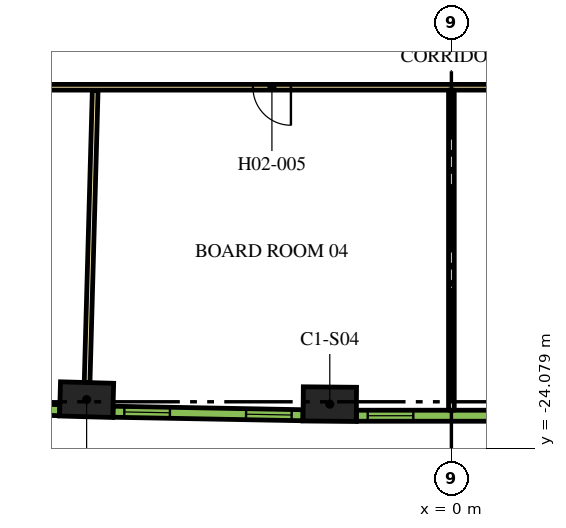
"""IFC4 building model, lengths in metres.
Left out: names, types, materials, properties, quantities, classifications, styles, units other than length and angle.
Written with IfcOpenShell. Run it as: python <this file> out.ifc"""

import sys

from ifc_helpers import new_model, si_unit, direction, frame, frame_2d, origin, origin_2d, place, context, subcontext, project, spatial, rectangle, extrude, element, fill, save


model = new_model("IFC4")
c1 = context("Model", 3, precision=1e-05, world=origin(), true_north=direction((0.0, 1.0)))
c2 = subcontext(c1, "Body", "Model", "MODEL_VIEW")
j1 = project(units=[si_unit("LENGTHUNIT", "METRE"), si_unit("PLANEANGLEUNIT", "RADIAN")], contexts=[c1])
p1 = place(None, origin())
s1 = spatial("IfcSite", under=j1, at=p1, CompositionType="ELEMENT")
p2 = place(p1, origin())
s2 = spatial("IfcBuilding", under=s1, at=p2, CompositionType="ELEMENT")
p3 = place(p2, frame((0.0, 0.0, 47.1)))
s3 = spatial("IfcBuildingStorey", under=s2, at=p3, CompositionType="ELEMENT", Elevation=47.1)
for number, where, z_axis, x_axis in (
    (1, (-9.599, -22.795, 0.0), (0.0, 0.0, 1.0), (1.0, -0.028, 0.0)),
    (2, (-3.2, -22.913, 0.0), (0.0, 0.0, 1.0), (1.0, -0.009, 0.0)),
):
    element("IfcColumn", number, at=place(p3, frame(where, z_axis=z_axis, x_axis=x_axis)), inside=s3, PredefinedType="COLUMN", context=c2, shape_type="SweptSolid", body=[
        extrude(rectangle(XDim=1.4, YDim=0.9, at=origin_2d()), origin(), (0.0, 0.0, 1.0), 3.9),
    ])
p4 = place(p3, frame((12.918, -14.575, 0.0), z_axis=(0.0, 0.0, 1.0), x_axis=(-1.0, 0.0, 0.0)))
e3 = element("IfcWall", 3, at=p4, inside=s3, PredefinedType="PARTITIONING", context=c2, shape_type="SweptSolid", body=[
    extrude(rectangle(XDim=25.766, YDim=0.15, at=frame_2d((12.883, 0.0))), origin(), (0.0, 0.0, 1.0), 2.75),
])
p5 = place(p4, frame((17.141, 0.0, 0.0)))
e4 = element("IfcOpeningElement", 4, at=p5, cuts=e3, PredefinedType="OPENING", context=c2, shape_type="SweptSolid", body=[
    extrude(rectangle(XDim=1.0, YDim=2.1, at=frame_2d((0.5, 1.05))), frame((0.0, 0.085, 0.0), z_axis=(0.0, -1.0, 0.0), x_axis=(1.0, 0.0, 0.0)), (0.0, 0.0, 1.0), 0.17),
])
p6 = place(p4, frame((9.259, 0.0, 0.0)))
e5 = element("IfcOpeningElement", 5, at=p6, cuts=e3, PredefinedType="OPENING", context=c2, shape_type="SweptSolid", body=[
    extrude(rectangle(XDim=1.0, YDim=2.1, at=frame_2d((0.5, 1.05))), frame((0.0, 0.085, 0.0), z_axis=(0.0, -1.0, 0.0), x_axis=(1.0, 0.0, 0.0)), (0.0, 0.0, 1.0), 0.17),
])
p7 = place(p4, frame((3.044, 0.0, 0.0)))
e6 = element("IfcOpeningElement", 6, at=p7, cuts=e3, PredefinedType="OPENING", context=c2, shape_type="SweptSolid", body=[
    extrude(rectangle(XDim=1.0, YDim=2.1, at=frame_2d((0.5, 1.05))), frame((0.0, 0.085, 0.0), z_axis=(0.0, -1.0, 0.0), x_axis=(1.0, 0.0, 0.0)), (0.0, 0.0, 1.0), 0.17),
])
p8 = place(p3, frame((-9.586, -22.345, 0.0), z_axis=(0.0, 0.0, 1.0), x_axis=(0.027722115646, 0.999615668297, 0.0)))
e7 = element("IfcWall", 7, at=p8, inside=s3, PredefinedType="PARTITIONING", context=c2, shape_type="SweptSolid", body=[
    extrude(rectangle(XDim=7.688, YDim=0.15, at=frame_2d((3.844, 0.0))), origin(), (0.0, 0.0, 1.0), 2.75),
])
p9 = place(p3, frame((0.0, -23.073, 0.0), z_axis=(0.0, 0.0, 1.0), x_axis=(0.0, 1.0, 0.0)))
e8 = element("IfcWall", 8, at=p9, inside=s3, PredefinedType="PARTITIONING", context=c2, shape_type="SweptSolid", body=[
    extrude(rectangle(XDim=8.423, YDim=0.15, at=frame_2d((4.212, 0.0))), origin(), (0.0, 0.0, 1.0), 2.75),
])
p10 = place(p3, frame((-15.305, -22.889, 0.0), z_axis=(0.0, 0.0, 1.0), x_axis=(0.999317974969, -0.036926750529, 0.0)))
e9 = element("IfcWall", 9, at=p10, inside=s3, PredefinedType="SOLIDWALL", context=c2, shape_type="SweptSolid", body=[
    extrude(rectangle(XDim=4.998, YDim=0.29, at=frame_2d((2.499, 0.0))), origin(), (0.0, 0.0, 1.0), 3.65),
])
p11 = place(p10, frame((0.297, 0.0, 0.9)))
e10 = element("IfcOpeningElement", 10, at=p11, cuts=e9, PredefinedType="OPENING", context=c2, shape_type="SweptSolid", body=[
    extrude(rectangle(XDim=1.2, YDim=2.15, at=frame_2d((0.6, 1.075))), frame((0.0, 0.155, 0.0), z_axis=(0.0, -1.0, 0.0), x_axis=(1.0, 0.0, 0.0)), (0.0, 0.0, 1.0), 0.31),
])
p12 = place(p10, frame((3.501, 0.0, 0.9)))
e11 = element("IfcOpeningElement", 11, at=p12, cuts=e9, PredefinedType="OPENING", context=c2, shape_type="SweptSolid", body=[
    extrude(rectangle(XDim=1.2, YDim=2.15, at=frame_2d((0.6, 1.075))), frame((0.0, 0.155, 0.0), z_axis=(0.0, -1.0, 0.0), x_axis=(1.0, 0.0, 0.0)), (0.0, 0.0, 1.0), 0.31),
])
p13 = place(p3, frame((-8.904, -23.113, 0.0), z_axis=(0.0, 0.0, 1.0), x_axis=(0.999829529479, -0.018463801951, 0.0)))
e12 = element("IfcWall", 12, at=p13, inside=s3, PredefinedType="SOLIDWALL", context=c2, shape_type="SweptSolid", body=[
    extrude(rectangle(XDim=4.998, YDim=0.29, at=frame_2d((2.499, 0.0))), origin(), (0.0, 0.0, 1.0), 3.65),
])
p14 = place(p13, frame((0.297, 0.0, 0.9)))
e13 = element("IfcOpeningElement", 13, at=p14, cuts=e12, PredefinedType="OPENING", context=c2, shape_type="SweptSolid", body=[
    extrude(rectangle(XDim=1.2, YDim=2.15, at=frame_2d((0.6, 1.075))), frame((0.0, 0.155, 0.0), z_axis=(0.0, -1.0, 0.0), x_axis=(1.0, 0.0, 0.0)), (0.0, 0.0, 1.0), 0.31),
])
p15 = place(p13, frame((3.501, 0.0, 0.9)))
e14 = element("IfcOpeningElement", 14, at=p15, cuts=e12, PredefinedType="OPENING", context=c2, shape_type="SweptSolid", body=[
    extrude(rectangle(XDim=1.2, YDim=2.15, at=frame_2d((0.6, 1.075))), frame((0.0, 0.155, 0.0), z_axis=(0.0, -1.0, 0.0), x_axis=(1.0, 0.0, 0.0)), (0.0, 0.0, 1.0), 0.31),
])
p16 = place(p3, frame((-2.499, -23.218, 0.0), z_axis=(0.0, 0.0, 1.0), x_axis=(1.0, 0.0, 0.0)))
e15 = element("IfcWall", 15, at=p16, inside=s3, PredefinedType="SOLIDWALL", context=c2, shape_type="SweptSolid", body=[
    extrude(rectangle(XDim=4.998, YDim=0.29, at=frame_2d((2.499, 0.0))), origin(), (0.0, 0.0, 1.0), 3.65),
])
p17 = place(p16, frame((0.297, 0.0, 0.9)))
e16 = element("IfcOpeningElement", 16, at=p17, cuts=e15, PredefinedType="OPENING", context=c2, shape_type="SweptSolid", body=[
    extrude(rectangle(XDim=1.2, YDim=2.15, at=frame_2d((0.6, 1.075))), frame((0.0, 0.155, 0.0), z_axis=(0.0, -1.0, 0.0), x_axis=(1.0, 0.0, 0.0)), (0.0, 0.0, 1.0), 0.31),
])
p18 = place(p16, frame((3.501, 0.0, 0.9)))
e17 = element("IfcOpeningElement", 17, at=p18, cuts=e15, PredefinedType="OPENING", context=c2, shape_type="SweptSolid", body=[
    extrude(rectangle(XDim=1.2, YDim=2.15, at=frame_2d((0.6, 1.075))), frame((0.0, 0.155, 0.0), z_axis=(0.0, -1.0, 0.0), x_axis=(1.0, 0.0, 0.0)), (0.0, 0.0, 1.0), 0.31),
])
p19 = place(p5, origin())
e18 = element("IfcDoor", 18, at=p19, inside=s3, OperationType="SINGLE_SWING_RIGHT", PredefinedType="DOOR", context=c2, shape_type="SweptSolid", body=[
    extrude(rectangle(XDim=1.0, YDim=2.1, at=frame_2d((0.5, 1.05))), frame((0.0, 0.025, 0.0), z_axis=(0.0, -1.0, 0.0), x_axis=(1.0, 0.0, 0.0)), (0.0, 0.0, 1.0), 0.05),
])
fill(e4, e18)
p20 = place(p14, origin())
e19 = element("IfcWindow", 19, at=p20, inside=s3, PartitioningType="DOUBLE_PANEL_VERTICAL", PredefinedType="WINDOW", context=c2, shape_type="SweptSolid", body=[
    extrude(rectangle(XDim=1.2, YDim=2.15, at=frame_2d((0.6, 1.075))), frame((0.0, 0.015, 0.0), z_axis=(0.0, -1.0, 0.0), x_axis=(1.0, 0.0, 0.0)), (0.0, 0.0, 1.0), 0.06),
])
fill(e13, e19)
p21 = place(p15, origin())
e20 = element("IfcWindow", 20, at=p21, inside=s3, PartitioningType="DOUBLE_PANEL_VERTICAL", PredefinedType="WINDOW", context=c2, shape_type="SweptSolid", body=[
    extrude(rectangle(XDim=1.2, YDim=2.15, at=frame_2d((0.6, 1.075))), frame((0.0, 0.015, 0.0), z_axis=(0.0, -1.0, 0.0), x_axis=(1.0, 0.0, 0.0)), (0.0, 0.0, 1.0), 0.06),
])
fill(e14, e20)
p22 = place(p17, origin())
e21 = element("IfcWindow", 21, at=p22, inside=s3, PartitioningType="DOUBLE_PANEL_VERTICAL", PredefinedType="WINDOW", context=c2, shape_type="SweptSolid", body=[
    extrude(rectangle(XDim=1.2, YDim=2.15, at=frame_2d((0.6, 1.075))), frame((0.0, 0.015, 0.0), z_axis=(0.0, -1.0, 0.0), x_axis=(1.0, 0.0, 0.0)), (0.0, 0.0, 1.0), 0.06),
])
fill(e16, e21)
save(model, sys.argv[1])
